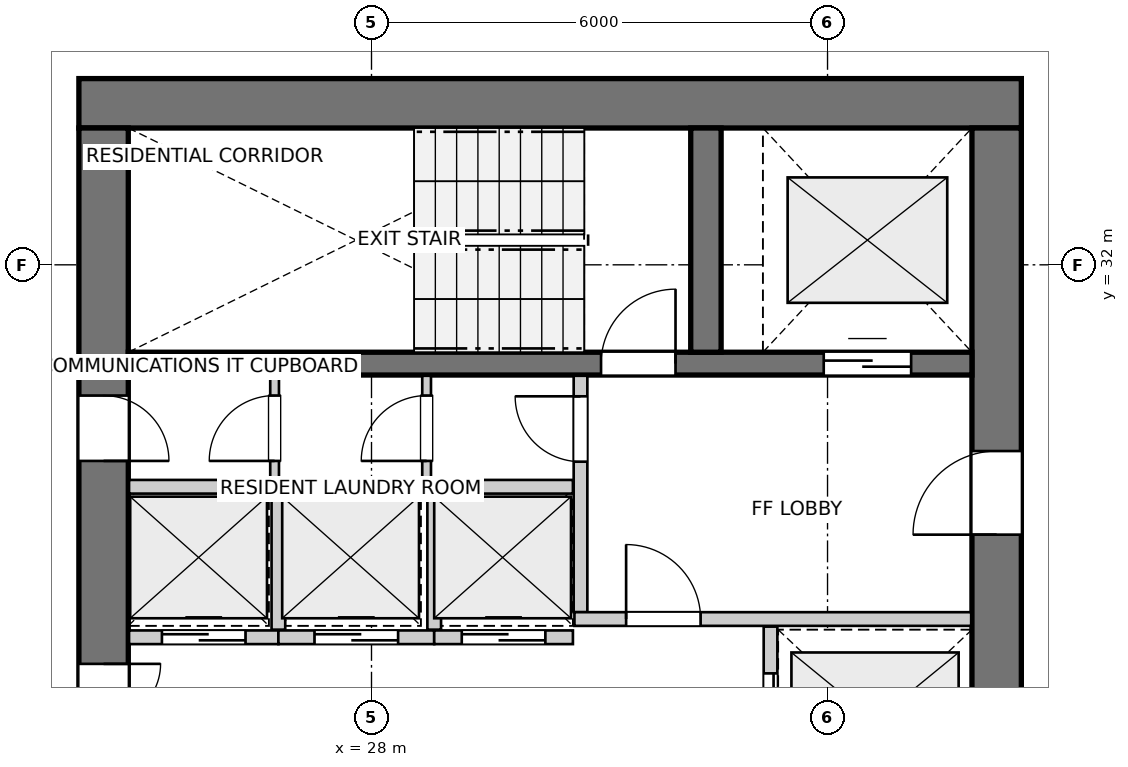
"""IFC4 building model, lengths in metres.
Left out: names, types, materials, properties, quantities, classifications, styles, units other than length and angle.
Written with IfcOpenShell. Run it as: python <this file> out.ifc"""

import sys

from ifc_helpers import new_model, si_unit, direction, frame, frame_2d, origin, place, context, subcontext, project, spatial, rectangle, extrude, source, transform, mapped, element, fill, save


model = new_model("IFC4")
c1 = context("Model", 3, precision=1e-05, world=origin(), true_north=direction((0.0, 1.0)))
c2 = subcontext(c1, "Body", "Model", "MODEL_VIEW")
j1 = project(units=[si_unit("LENGTHUNIT", "METRE"), si_unit("PLANEANGLEUNIT", "RADIAN")], contexts=[c1])
p1 = place(None, origin())
s1 = spatial("IfcSite", under=j1, at=p1, CompositionType="ELEMENT")
p2 = place(p1, origin())
s2 = spatial("IfcBuilding", under=s1, at=p2, CompositionType="ELEMENT")
p3 = place(p2, frame((0.0, 0.0, 124.8)))
s3 = spatial("IfcBuildingStorey", under=s2, at=p3, CompositionType="ELEMENT", Elevation=124.8)
p4 = place(p3, frame((36.55, 34.125, 0.0), z_axis=(0.0, 0.0, 1.0), x_axis=(-1.0, 0.0, 0.0)))
e1 = element("IfcWall", 1, at=p4, inside=s3, PredefinedType="SHEAR", context=c2, shape_type="SweptSolid", body=[
    extrude(rectangle(XDim=12.4, YDim=0.65, at=frame_2d((6.2, 0.0))), origin(), (0.0, 0.0, 1.0), 2.9),
])
p5 = place(p3, frame((24.475, 33.8, 0.0), z_axis=(0.0, 0.0, 1.0), x_axis=(0.0, -1.0, 0.0)))
e2 = element("IfcWall", 2, at=p5, inside=s3, PredefinedType="SHEAR", context=c2, shape_type="SweptSolid", body=[
    extrude(rectangle(XDim=15.6, YDim=0.65, at=frame_2d((7.8, 0.0))), origin(), (0.0, 0.0, 1.0), 2.9),
])
p6 = place(p5, frame((7.05, 0.0, 0.0)))
e3 = element("IfcOpeningElement", 3, at=p6, cuts=e2, PredefinedType="OPENING", context=c2, shape_type="SweptSolid", body=[
    extrude(rectangle(XDim=1.5, YDim=2.15, at=frame_2d((0.75, 1.075))), frame((0.0, 0.335, 0.0), z_axis=(0.0, -1.0, 0.0), x_axis=(1.0, 0.0, 0.0)), (0.0, 0.0, 1.0), 0.67),
])
p7 = place(p5, frame((3.52, 0.0, 0.0)))
e4 = element("IfcOpeningElement", 4, at=p7, cuts=e2, PredefinedType="OPENING", context=c2, shape_type="SweptSolid", body=[
    extrude(rectangle(XDim=0.86, YDim=2.05, at=frame_2d((0.43, 1.025))), frame((0.0, 0.335, 0.0), z_axis=(0.0, -1.0, 0.0), x_axis=(1.0, 0.0, 0.0)), (0.0, 0.0, 1.0), 0.67),
])
p8 = place(p5, frame((11.22, 0.0, 0.0)))
e5 = element("IfcOpeningElement", 5, at=p8, cuts=e2, PredefinedType="OPENING", context=c2, shape_type="SweptSolid", body=[
    extrude(rectangle(XDim=0.86, YDim=2.05, at=frame_2d((0.43, 1.025))), frame((0.0, 0.335, 0.0), z_axis=(0.0, -1.0, 0.0), x_axis=(1.0, 0.0, 0.0)), (0.0, 0.0, 1.0), 0.67),
])
p9 = place(p3, frame((36.225, 18.2, 0.0), z_axis=(0.0, 0.0, 1.0), x_axis=(0.0, 1.0, 0.0)))
e6 = element("IfcWall", 6, at=p9, inside=s3, PredefinedType="SHEAR", context=c2, shape_type="SweptSolid", body=[
    extrude(rectangle(XDim=15.6, YDim=0.65, at=frame_2d((7.8, 0.0))), origin(), (0.0, 0.0, 1.0), 2.9),
])
p10 = place(p9, frame((4.25, 0.0, 0.0)))
e7 = element("IfcOpeningElement", 7, at=p10, cuts=e6, PredefinedType="OPENING", context=c2, shape_type="SweptSolid", body=[
    extrude(rectangle(XDim=1.1, YDim=2.15, at=frame_2d((0.55, 1.075))), frame((0.0, 0.335, 0.0), z_axis=(0.0, -1.0, 0.0), x_axis=(1.0, 0.0, 0.0)), (0.0, 0.0, 1.0), 0.67),
])
p11 = place(p9, frame((10.25, 0.0, 0.0)))
e8 = element("IfcOpeningElement", 8, at=p11, cuts=e6, PredefinedType="OPENING", context=c2, shape_type="SweptSolid", body=[
    extrude(rectangle(XDim=1.1, YDim=2.15, at=frame_2d((0.55, 1.075))), frame((0.0, 0.335, 0.0), z_axis=(0.0, -1.0, 0.0), x_axis=(1.0, 0.0, 0.0)), (0.0, 0.0, 1.0), 0.67),
])
p12 = place(p3, frame((24.8, 30.7, 0.0), z_axis=(0.0, 0.0, 1.0), x_axis=(1.0, 0.0, 0.0)))
e9 = element("IfcWall", 9, at=p12, inside=s3, PredefinedType="SHEAR", context=c2, shape_type="SweptSolid", body=[
    extrude(rectangle(XDim=11.1, YDim=0.3, at=frame_2d((5.55, 0.0))), origin(), (0.0, 0.0, 1.0), 2.9),
])
p13 = place(p12, frame((6.22, 0.0, 0.0)))
e10 = element("IfcOpeningElement", 10, at=p13, cuts=e9, PredefinedType="OPENING", context=c2, shape_type="SweptSolid", body=[
    extrude(rectangle(XDim=0.98, YDim=2.15, at=frame_2d((0.49, 1.075))), frame((0.0, 0.16, 0.0), z_axis=(0.0, -1.0, 0.0), x_axis=(1.0, 0.0, 0.0)), (0.0, 0.0, 1.0), 0.32),
])
p14 = place(p12, frame((9.15, 0.0, 0.0)))
e11 = element("IfcOpeningElement", 11, at=p14, cuts=e9, PredefinedType="OPENING", context=c2, shape_type="SweptSolid", body=[
    extrude(rectangle(XDim=1.15, YDim=2.15, at=frame_2d((0.575, 1.075))), frame((0.0, 0.16, 0.0), z_axis=(0.0, -1.0, 0.0), x_axis=(1.0, 0.0, 0.0)), (0.0, 0.0, 1.0), 0.32),
])
p15 = place(p3, frame((32.4, 30.85, 0.0), z_axis=(0.0, 0.0, 1.0), x_axis=(0.0, 1.0, 0.0)))
e12 = element("IfcWall", 12, at=p15, inside=s3, PredefinedType="SHEAR", context=c2, shape_type="SweptSolid", body=[
    extrude(rectangle(XDim=2.95, YDim=0.4, at=frame_2d((1.475, 0.0))), origin(), (0.0, 0.0, 1.0), 2.9),
])
p16 = place(p3, frame((30.75, 27.43, 0.0), z_axis=(0.0, 0.0, 1.0), x_axis=(0.0, 1.0, 0.0)))
e13 = element("IfcWall", 13, at=p16, inside=s3, PredefinedType="PARTITIONING", context=c2, shape_type="SweptSolid", body=[
    extrude(rectangle(XDim=3.11, YDim=0.18, at=frame_2d((1.555, 0.0))), origin(), (0.0, 0.0, 1.0), 2.9),
])
p17 = place(p16, frame((1.98, 0.0, 0.0)))
e14 = element("IfcOpeningElement", 14, at=p17, cuts=e13, PredefinedType="OPENING", context=c2, shape_type="SweptSolid", body=[
    extrude(rectangle(XDim=0.86, YDim=2.05, at=frame_2d((0.43, 1.025))), frame((0.0, 0.1, 0.0), z_axis=(0.0, -1.0, 0.0), x_axis=(1.0, 0.0, 0.0)), (0.0, 0.0, 1.0), 0.2),
])
p18 = place(p3, frame((30.67, 27.34, 0.0), z_axis=(0.0, 0.0, 1.0), x_axis=(1.0, 0.0, 0.0)))
e15 = element("IfcWall", 15, at=p18, inside=s3, PredefinedType="PARTITIONING", context=c2, shape_type="SweptSolid", body=[
    extrude(rectangle(XDim=5.22, YDim=0.18, at=frame_2d((2.61, 0.0))), origin(), (0.0, 0.0, 1.0), 2.9),
])
p19 = place(p18, frame((0.68, 0.0, 0.0)))
e16 = element("IfcOpeningElement", 16, at=p19, cuts=e15, PredefinedType="OPENING", context=c2, shape_type="SweptSolid", body=[
    extrude(rectangle(XDim=0.98, YDim=2.15, at=frame_2d((0.49, 1.075))), frame((0.0, 0.1, 0.0), z_axis=(0.0, -1.0, 0.0), x_axis=(1.0, 0.0, 0.0)), (0.0, 0.0, 1.0), 0.2),
])
p20 = place(p3, frame((33.25, 24.76, 0.0), z_axis=(0.0, 0.0, 1.0), x_axis=(0.0, 1.0, 0.0)))
e17 = element("IfcWall", 17, at=p20, inside=s3, PredefinedType="PARTITIONING", context=c2, shape_type="SweptSolid", body=[
    extrude(rectangle(XDim=2.48, YDim=0.18, at=frame_2d((1.24, 0.0))), origin(), (0.0, 0.0, 1.0), 2.9),
])
p21 = place(p20, frame((0.615, 0.0, 0.0)))
e18 = element("IfcOpeningElement", 18, at=p21, cuts=e17, PredefinedType="OPENING", context=c2, shape_type="SweptSolid", body=[
    extrude(rectangle(XDim=1.25, YDim=2.15, at=frame_2d((0.625, 1.075))), frame((0.0, 0.1, 0.0), z_axis=(0.0, -1.0, 0.0), x_axis=(1.0, 0.0, 0.0)), (0.0, 0.0, 1.0), 0.2),
])
p22 = place(p3, frame((24.81, 29.08, 0.0), z_axis=(0.0, 0.0, 1.0), x_axis=(1.0, 0.0, 0.0)))
e19 = element("IfcWall", 19, at=p22, inside=s3, PredefinedType="PARTITIONING", context=c2, shape_type="SweptSolid", body=[
    extrude(rectangle(XDim=5.84, YDim=0.18, at=frame_2d((2.92, 0.0))), origin(), (0.0, 0.0, 1.0), 2.9),
])
p23 = place(p3, frame((24.81, 27.1, 0.0), z_axis=(0.0, 0.0, 1.0), x_axis=(1.0, 0.0, 0.0)))
e20 = element("IfcWall", 20, at=p23, inside=s3, PredefinedType="PARTITIONING", context=c2, shape_type="SweptSolid", body=[
    extrude(rectangle(XDim=1.965, YDim=0.18, at=frame_2d((0.982, 0.0))), origin(), (0.0, 0.0, 1.0), 2.9),
])
p24 = place(p23, frame((0.433, 0.0, 0.0)))
e21 = element("IfcOpeningElement", 21, at=p24, cuts=e20, PredefinedType="OPENING", context=c2, shape_type="SweptSolid", body=[
    extrude(rectangle(XDim=1.1, YDim=2.15, at=frame_2d((0.55, 1.075))), frame((0.0, 0.1, 0.0), z_axis=(0.0, -1.0, 0.0), x_axis=(1.0, 0.0, 0.0)), (0.0, 0.0, 1.0), 0.2),
])
p25 = place(p3, frame((26.775, 27.1, 0.0), z_axis=(0.0, 0.0, 1.0), x_axis=(1.0, 0.0, 0.0)))
e22 = element("IfcWall", 22, at=p25, inside=s3, PredefinedType="PARTITIONING", context=c2, shape_type="SweptSolid", body=[
    extrude(rectangle(XDim=2.05, YDim=0.18, at=frame_2d((1.025, 0.0))), origin(), (0.0, 0.0, 1.0), 2.9),
])
p26 = place(p25, frame((0.475, 0.0, 0.0)))
e23 = element("IfcOpeningElement", 23, at=p26, cuts=e22, PredefinedType="OPENING", context=c2, shape_type="SweptSolid", body=[
    extrude(rectangle(XDim=1.1, YDim=2.15, at=frame_2d((0.55, 1.075))), frame((0.0, 0.1, 0.0), z_axis=(0.0, -1.0, 0.0), x_axis=(1.0, 0.0, 0.0)), (0.0, 0.0, 1.0), 0.2),
])
p27 = place(p3, frame((26.775, 27.2, 0.0), z_axis=(0.0, 0.0, 1.0), x_axis=(0.0, 1.0, 0.0)))
e24 = element("IfcWall", 24, at=p27, inside=s3, PredefinedType="PARTITIONING", context=c2, shape_type="SweptSolid", body=[
    extrude(rectangle(XDim=1.78, YDim=0.18, at=frame_2d((0.89, 0.0))), origin(), (0.0, 0.0, 1.0), 2.9),
])
p28 = place(p3, frame((28.825, 27.1, 0.0), z_axis=(0.0, 0.0, 1.0), x_axis=(1.0, 0.0, 0.0)))
e25 = element("IfcWall", 25, at=p28, inside=s3, PredefinedType="PARTITIONING", context=c2, shape_type="SweptSolid", body=[
    extrude(rectangle(XDim=1.825, YDim=0.18, at=frame_2d((0.913, 0.0))), origin(), (0.0, 0.0, 1.0), 2.9),
])
p29 = place(p28, frame((0.363, 0.0, 0.0)))
e26 = element("IfcOpeningElement", 26, at=p29, cuts=e25, PredefinedType="OPENING", context=c2, shape_type="SweptSolid", body=[
    extrude(rectangle(XDim=1.1, YDim=2.15, at=frame_2d((0.55, 1.075))), frame((0.0, 0.1, 0.0), z_axis=(0.0, -1.0, 0.0), x_axis=(1.0, 0.0, 0.0)), (0.0, 0.0, 1.0), 0.2),
])
p30 = place(p3, frame((28.825, 27.2, 0.0), z_axis=(0.0, 0.0, 1.0), x_axis=(0.0, 1.0, 0.0)))
e27 = element("IfcWall", 27, at=p30, inside=s3, PredefinedType="PARTITIONING", context=c2, shape_type="SweptSolid", body=[
    extrude(rectangle(XDim=1.78, YDim=0.18, at=frame_2d((0.89, 0.0))), origin(), (0.0, 0.0, 1.0), 2.9),
])
p31 = place(p3, frame((26.725, 29.16, 0.0), z_axis=(0.0, 0.0, 1.0), x_axis=(0.0, 1.0, 0.0)))
e28 = element("IfcWall", 28, at=p31, inside=s3, PredefinedType="PARTITIONING", context=c2, shape_type="SweptSolid", body=[
    extrude(rectangle(XDim=1.38, YDim=0.115, at=frame_2d((0.69, 0.0))), origin(), (0.0, 0.0, 1.0), 2.9),
])
p32 = place(p31, frame((0.26, 0.0, 0.0)))
e29 = element("IfcOpeningElement", 29, at=p32, cuts=e28, PredefinedType="OPENING", context=c2, shape_type="SweptSolid", body=[
    extrude(rectangle(XDim=0.86, YDim=2.05, at=frame_2d((0.43, 1.025))), frame((0.0, 0.067, 0.0), z_axis=(0.0, -1.0, 0.0), x_axis=(1.0, 0.0, 0.0)), (0.0, 0.0, 1.0), 0.135),
])
p33 = place(p3, frame((28.725, 29.16, 0.0), z_axis=(0.0, 0.0, 1.0), x_axis=(0.0, 1.0, 0.0)))
e30 = element("IfcWall", 30, at=p33, inside=s3, PredefinedType="PARTITIONING", context=c2, shape_type="SweptSolid", body=[
    extrude(rectangle(XDim=1.38, YDim=0.115, at=frame_2d((0.69, 0.0))), origin(), (0.0, 0.0, 1.0), 2.9),
])
p34 = place(p33, frame((0.26, 0.0, 0.0)))
e31 = element("IfcOpeningElement", 31, at=p34, cuts=e30, PredefinedType="OPENING", context=c2, shape_type="SweptSolid", body=[
    extrude(rectangle(XDim=0.86, YDim=2.05, at=frame_2d((0.43, 1.025))), frame((0.0, 0.067, 0.0), z_axis=(0.0, -1.0, 0.0), x_axis=(1.0, 0.0, 0.0)), (0.0, 0.0, 1.0), 0.135),
])
m1 = source(origin(), c2, "Body", "SweptSolid", [
    extrude(rectangle(XDim=0.98, YDim=2.15, at=frame_2d((0.49, 1.075))), frame((0.0, 0.025, 0.0), z_axis=(0.0, -1.0, 0.0), x_axis=(1.0, 0.0, 0.0)), (0.0, 0.0, 1.0), 0.05),
])
p35 = place(p13, origin())
e32 = element("IfcDoor", 32, at=p35, inside=s3, OperationType="SINGLE_SWING_RIGHT", PredefinedType="DOOR", context=c2, shape_type="MappedRepresentation", body=[
    mapped(m1, transform((0.0, 0.0, 0.0), x_axis=(1.0, 0.0, 0.0), y_axis=(0.0, 1.0, 0.0), z_axis=(0.0, 0.0, 1.0), scale=1.0)),
])
fill(e10, e32)
m2 = source(origin(), c2, "Body", "SweptSolid", [
    extrude(rectangle(XDim=1.15, YDim=2.15, at=frame_2d((0.575, 1.075))), frame((0.0, 0.025, 0.0), z_axis=(0.0, -1.0, 0.0), x_axis=(1.0, 0.0, 0.0)), (0.0, 0.0, 1.0), 0.05),
])
p36 = place(p14, origin())
e33 = element("IfcDoor", 33, at=p36, inside=s3, OperationType="DOUBLE_DOOR_SLIDING", PredefinedType="DOOR", context=c2, shape_type="MappedRepresentation", body=[
    mapped(m2, transform((0.0, 0.0, 0.0), x_axis=(1.0, 0.0, 0.0), y_axis=(0.0, 1.0, 0.0), z_axis=(0.0, 0.0, 1.0), scale=1.0)),
])
fill(e11, e33)
m3 = source(origin(), c2, "Body", "SweptSolid", [
    extrude(rectangle(XDim=1.1, YDim=2.15, at=frame_2d((0.55, 1.075))), frame((0.0, 0.025, 0.0), z_axis=(0.0, -1.0, 0.0), x_axis=(1.0, 0.0, 0.0)), (0.0, 0.0, 1.0), 0.05),
])
p37 = place(p11, origin())
e34 = element("IfcDoor", 34, at=p37, inside=s3, OperationType="SINGLE_SWING_LEFT", PredefinedType="DOOR", context=c2, shape_type="MappedRepresentation", body=[
    mapped(m3, transform((0.0, 0.0, 0.0), x_axis=(1.0, 0.0, 0.0), y_axis=(0.0, 1.0, 0.0), z_axis=(0.0, 0.0, 1.0), scale=1.0)),
])
fill(e8, e34)
m4 = source(origin(), c2, "Body", "SweptSolid", [
    extrude(rectangle(XDim=1.5, YDim=2.15, at=frame_2d((0.75, 1.075))), frame((0.0, 0.025, 0.0), z_axis=(0.0, -1.0, 0.0), x_axis=(1.0, 0.0, 0.0)), (0.0, 0.0, 1.0), 0.05),
])
p38 = place(p6, origin())
e35 = element("IfcDoor", 35, at=p38, inside=s3, OperationType="DOUBLE_DOOR_SINGLE_SWING", PredefinedType="DOOR", context=c2, shape_type="MappedRepresentation", body=[
    mapped(m4, transform((0.0, 0.0, 0.0), x_axis=(1.0, 0.0, 0.0), y_axis=(0.0, 1.0, 0.0), z_axis=(0.0, 0.0, 1.0), scale=1.0)),
])
fill(e3, e35)
m5 = source(origin(), c2, "Body", "SweptSolid", [
    extrude(rectangle(XDim=0.86, YDim=2.05, at=frame_2d((0.43, 1.025))), frame((0.0, 0.025, 0.0), z_axis=(0.0, -1.0, 0.0), x_axis=(1.0, 0.0, 0.0)), (0.0, 0.0, 1.0), 0.05),
])
p39 = place(p7, origin())
e36 = element("IfcDoor", 36, at=p39, inside=s3, OperationType="SINGLE_SWING_RIGHT", PredefinedType="DOOR", context=c2, shape_type="MappedRepresentation", body=[
    mapped(m5, transform((0.0, 0.0, 0.0), x_axis=(1.0, 0.0, 0.0), y_axis=(0.0, 1.0, 0.0), z_axis=(0.0, 0.0, 1.0), scale=1.0)),
])
fill(e4, e36)
p40 = place(p17, origin())
e37 = element("IfcDoor", 37, at=p40, inside=s3, OperationType="SINGLE_SWING_RIGHT", PredefinedType="DOOR", context=c2, shape_type="MappedRepresentation", body=[
    mapped(m5, transform((0.0, 0.0, 0.0), x_axis=(1.0, 0.0, 0.0), y_axis=(0.0, 1.0, 0.0), z_axis=(0.0, 0.0, 1.0), scale=1.0)),
])
fill(e14, e37)
p41 = place(p19, origin())
e38 = element("IfcDoor", 38, at=p41, inside=s3, OperationType="SINGLE_SWING_LEFT", PredefinedType="DOOR", context=c2, shape_type="MappedRepresentation", body=[
    mapped(m1, transform((0.0, 0.0, 0.0), x_axis=(1.0, 0.0, 0.0), y_axis=(0.0, 1.0, 0.0), z_axis=(0.0, 0.0, 1.0), scale=1.0)),
])
fill(e16, e38)
m6 = source(origin(), c2, "Body", "SweptSolid", [
    extrude(rectangle(XDim=1.25, YDim=2.15, at=frame_2d((0.625, 1.075))), frame((0.0, 0.025, 0.0), z_axis=(0.0, -1.0, 0.0), x_axis=(1.0, 0.0, 0.0)), (0.0, 0.0, 1.0), 0.05),
])
p42 = place(p21, origin())
e39 = element("IfcDoor", 39, at=p42, inside=s3, OperationType="DOUBLE_DOOR_SLIDING", PredefinedType="DOOR", context=c2, shape_type="MappedRepresentation", body=[
    mapped(m6, transform((0.0, 0.0, 0.0), x_axis=(1.0, 0.0, 0.0), y_axis=(0.0, 1.0, 0.0), z_axis=(0.0, 0.0, 1.0), scale=1.0)),
])
fill(e18, e39)
p43 = place(p24, origin())
e40 = element("IfcDoor", 40, at=p43, inside=s3, OperationType="DOUBLE_DOOR_SLIDING", PredefinedType="DOOR", context=c2, shape_type="MappedRepresentation", body=[
    mapped(m3, transform((0.0, 0.0, 0.0), x_axis=(1.0, 0.0, 0.0), y_axis=(0.0, 1.0, 0.0), z_axis=(0.0, 0.0, 1.0), scale=1.0)),
])
fill(e21, e40)
p44 = place(p26, origin())
e41 = element("IfcDoor", 41, at=p44, inside=s3, OperationType="DOUBLE_DOOR_SLIDING", PredefinedType="DOOR", context=c2, shape_type="MappedRepresentation", body=[
    mapped(m3, transform((0.0, 0.0, 0.0), x_axis=(1.0, 0.0, 0.0), y_axis=(0.0, 1.0, 0.0), z_axis=(0.0, 0.0, 1.0), scale=1.0)),
])
fill(e23, e41)
p45 = place(p29, origin())
e42 = element("IfcDoor", 42, at=p45, inside=s3, OperationType="DOUBLE_DOOR_SLIDING", PredefinedType="DOOR", context=c2, shape_type="MappedRepresentation", body=[
    mapped(m3, transform((0.0, 0.0, 0.0), x_axis=(1.0, 0.0, 0.0), y_axis=(0.0, 1.0, 0.0), z_axis=(0.0, 0.0, 1.0), scale=1.0)),
])
fill(e26, e42)
p46 = place(p32, origin())
e43 = element("IfcDoor", 43, at=p46, inside=s3, OperationType="SINGLE_SWING_LEFT", PredefinedType="DOOR", context=c2, shape_type="MappedRepresentation", body=[
    mapped(m5, transform((0.0, 0.0, 0.0), x_axis=(1.0, 0.0, 0.0), y_axis=(0.0, 1.0, 0.0), z_axis=(0.0, 0.0, 1.0), scale=1.0)),
])
fill(e29, e43)
p47 = place(p34, origin())
e44 = element("IfcDoor", 44, at=p47, inside=s3, OperationType="SINGLE_SWING_LEFT", PredefinedType="DOOR", context=c2, shape_type="MappedRepresentation", body=[
    mapped(m5, transform((0.0, 0.0, 0.0), x_axis=(1.0, 0.0, 0.0), y_axis=(0.0, 1.0, 0.0), z_axis=(0.0, 0.0, 1.0), scale=1.0)),
])
fill(e31, e44)
save(model, sys.argv[1])
